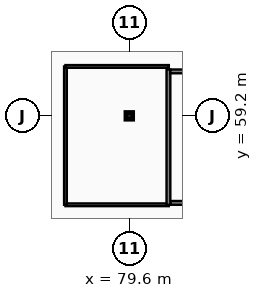
"""IFC4 building model, lengths in metres.
Left out: names, types, materials, properties, quantities, classifications, styles, units other than length and angle.
Written with IfcOpenShell. Run it as: python <this file> out.ifc"""

import sys

from ifc_helpers import new_model, si_unit, direction, frame, frame_2d, origin, origin_2d, place, context, subcontext, project, spatial, rectangle, extrude, element, fill, save


model = new_model("IFC4")
c1 = context("Model", 3, precision=1e-05, world=origin(), true_north=direction((0.0, 1.0)))
c2 = subcontext(c1, "Body", "Model", "MODEL_VIEW")
j1 = project(units=[si_unit("LENGTHUNIT", "METRE"), si_unit("PLANEANGLEUNIT", "RADIAN")], contexts=[c1])
p1 = place(None, origin())
s1 = spatial("IfcSite", under=j1, at=p1, CompositionType="ELEMENT")
p2 = place(p1, origin())
s2 = spatial("IfcBuilding", under=s1, at=p2, CompositionType="ELEMENT")
p3 = place(p2, frame((0.0, 0.0, 5.4)))
s3 = spatial("IfcBuildingStorey", under=s2, at=p3, CompositionType="ELEMENT", Elevation=5.4)
p4 = place(p3, frame((79.6, 59.2, 0.0), z_axis=(0.0, 0.0, 1.0), x_axis=(1.0, 0.0, 0.0)))
e1 = element("IfcColumn", 1, at=p4, inside=s3, PredefinedType="COLUMN", context=c2, shape_type="SweptSolid", body=[
    extrude(rectangle(XDim=0.44, YDim=0.44, at=origin_2d()), origin(), (0.0, 0.0, 1.0), 4.2),
])
p5 = place(p3, frame((75.4, 53.35, 0.0), z_axis=(0.0, 0.0, 1.0), x_axis=(1.0, 0.0, 0.0)))
e2 = element("IfcWall", 2, at=p5, inside=s3, PredefinedType="PARTITIONING", context=c2, shape_type="SweptSolid", body=[
    extrude(rectangle(XDim=6.8, YDim=0.18, at=frame_2d((3.4, 0.0))), origin(), (0.0, 0.0, 1.0), 3.37),
])
p6 = place(p3, frame((75.4, 53.35, 0.0), z_axis=(0.0, 0.0, 1.0), x_axis=(0.0, 1.0, 0.0)))
e3 = element("IfcWall", 3, at=p6, inside=s3, PredefinedType="PARTITIONING", context=c2, shape_type="SweptSolid", body=[
    extrude(rectangle(XDim=9.1, YDim=0.18, at=frame_2d((4.55, 0.0))), origin(), (0.0, 0.0, 1.0), 3.25),
])
p7 = place(p6, frame((4.05, 0.0, -0.01)))
e4 = element("IfcOpeningElement", 4, at=p7, cuts=e3, PredefinedType="OPENING", context=c2, shape_type="SweptSolid", body=[
    extrude(rectangle(XDim=1.0, YDim=2.16, at=frame_2d((0.5, 1.08))), frame((0.0, 0.1, 0.0), z_axis=(0.0, -1.0, 0.0), x_axis=(1.0, 0.0, 0.0)), (0.0, 0.0, 1.0), 0.2),
])
p8 = place(p3, frame((75.4, 62.45, 0.0), z_axis=(0.0, 0.0, 1.0), x_axis=(1.0, 0.0, 0.0)))
e5 = element("IfcWall", 5, at=p8, inside=s3, PredefinedType="PARTITIONING", context=c2, shape_type="SweptSolid", body=[
    extrude(rectangle(XDim=6.8, YDim=0.18, at=frame_2d((3.4, 0.0))), origin(), (0.0, 0.0, 1.0), 3.37),
])
p9 = place(p3, frame((82.3, 53.475, 0.0), z_axis=(0.0, 0.0, 1.0), x_axis=(1.0, 0.0, 0.0)))
e6 = element("IfcWall", 6, at=p9, inside=s3, PredefinedType="SHEAR", context=c2, shape_type="SweptSolid", body=[
    extrude(rectangle(XDim=3.5, YDim=0.25, at=frame_2d((1.75, 0.0))), origin(), (0.0, 0.0, 1.0), 4.2),
])
p10 = place(p9, frame((1.1, 0.0, -0.01)))
e7 = element("IfcOpeningElement", 7, at=p10, cuts=e6, PredefinedType="OPENING", context=c2, shape_type="SweptSolid", body=[
    extrude(rectangle(XDim=1.3, YDim=2.16, at=frame_2d((0.65, 1.08))), frame((0.0, 0.135, 0.0), z_axis=(0.0, -1.0, 0.0), x_axis=(1.0, 0.0, 0.0)), (0.0, 0.0, 1.0), 0.27),
])
p11 = place(p3, frame((82.175, 53.35, 0.0), z_axis=(0.0, 0.0, 1.0), x_axis=(0.0, 1.0, 0.0)))
e8 = element("IfcWall", 8, at=p11, inside=s3, PredefinedType="SHEAR", context=c2, shape_type="SweptSolid", body=[
    extrude(rectangle(XDim=8.9, YDim=0.25, at=frame_2d((4.45, 0.0))), origin(), (0.0, 0.0, 1.0), 4.2),
])
p12 = place(p3, frame((85.8, 62.125, 0.0), z_axis=(0.0, 0.0, 1.0), x_axis=(-1.0, 0.0, 0.0)))
e9 = element("IfcWall", 9, at=p12, inside=s3, PredefinedType="SHEAR", context=c2, shape_type="SweptSolid", body=[
    extrude(rectangle(XDim=3.5, YDim=0.25, at=frame_2d((1.75, 0.0))), origin(), (0.0, 0.0, 1.0), 4.2),
])
p13 = place(p7, frame((0.0, 0.0, 0.01)))
e10 = element("IfcDoor", 10, at=p13, inside=s3, OperationType="SINGLE_SWING_RIGHT", PredefinedType="DOOR", context=c2, shape_type="SweptSolid", body=[
    extrude(rectangle(XDim=1.0, YDim=2.15, at=frame_2d((0.5, 1.075))), frame((0.0, 0.025, 0.0), z_axis=(0.0, -1.0, 0.0), x_axis=(1.0, 0.0, 0.0)), (0.0, 0.0, 1.0), 0.05),
])
fill(e4, e10)
save(model, sys.argv[1])
